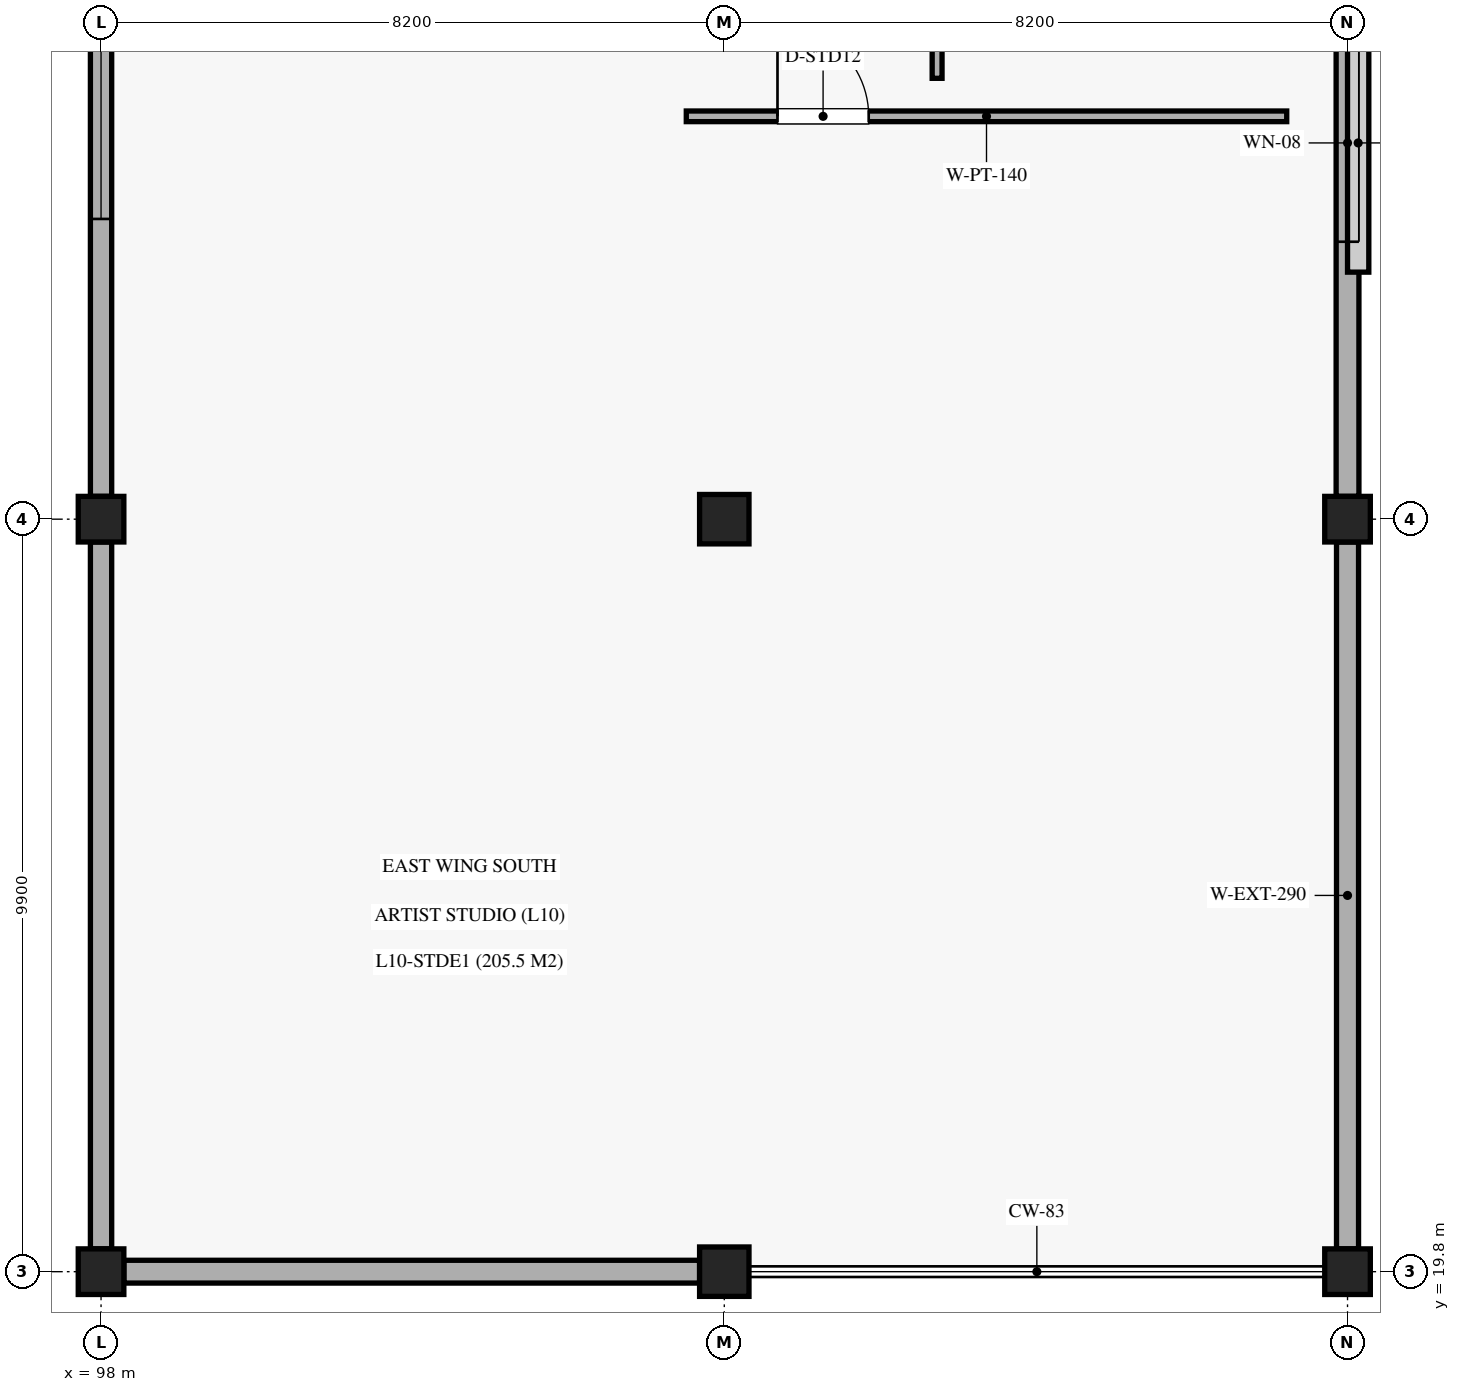
"""IFC4 building model, lengths in metres.
Left out: names, types, materials, properties, quantities, classifications, styles, units other than length and angle.
Written with IfcOpenShell. Run it as: python <this file> out.ifc"""

import sys

from ifc_helpers import new_model, si_unit, direction, frame, frame_2d, origin, origin_2d, place, context, subcontext, project, spatial, rectangle, extrude, element, fill, save


model = new_model("IFC4")
c1 = context("Model", 3, precision=1e-05, world=origin(), true_north=direction((0.0, 1.0)))
c2 = subcontext(c1, "Body", "Model", "MODEL_VIEW")
j1 = project(units=[si_unit("LENGTHUNIT", "METRE"), si_unit("PLANEANGLEUNIT", "RADIAN")], contexts=[c1])
p1 = place(None, origin())
s1 = spatial("IfcSite", under=j1, at=p1, CompositionType="ELEMENT")
p2 = place(p1, origin())
s2 = spatial("IfcBuilding", under=s1, at=p2, CompositionType="ELEMENT")
p3 = place(p2, frame((0.0, 0.0, 52.02)))
s3 = spatial("IfcBuildingStorey", under=s2, at=p3, CompositionType="ELEMENT", Elevation=52.02)
for number, where, z_axis, x_axis in (
    (1, (98.0, 19.8, 0.0), (0.0, 0.0, 1.0), (1.0, 0.0, 0.0)),
    (2, (98.0, 29.7, 0.0), (0.0, 0.0, 1.0), (1.0, 0.0, 0.0)),
):
    element("IfcColumn", number, at=place(p3, frame(where, z_axis=z_axis, x_axis=x_axis)), inside=s3, PredefinedType="COLUMN", context=c2, shape_type="SweptSolid", body=[
        extrude(rectangle(XDim=0.6, YDim=0.6, at=origin_2d()), origin(), (0.0, 0.0, 1.0), 5.1),
    ])
for number, where, z_axis, x_axis in (
    (3, (106.2, 19.8, 0.0), (0.0, 0.0, 1.0), (1.0, 0.0, 0.0)),
    (4, (106.2, 29.7, 0.0), (0.0, 0.0, 1.0), (1.0, 0.0, 0.0)),
):
    element("IfcColumn", number, at=place(p3, frame(where, z_axis=z_axis, x_axis=x_axis)), inside=s3, PredefinedType="COLUMN", context=c2, shape_type="SweptSolid", body=[
        extrude(rectangle(XDim=0.65, YDim=0.65, at=origin_2d()), origin(), (0.0, 0.0, 1.0), 5.1),
    ])
for number, where, z_axis, x_axis in (
    (5, (114.4, 19.8, 0.0), (0.0, 0.0, 1.0), (1.0, 0.0, 0.0)),
    (6, (114.4, 29.7, 0.0), (0.0, 0.0, 1.0), (1.0, 0.0, 0.0)),
):
    element("IfcColumn", number, at=place(p3, frame(where, z_axis=z_axis, x_axis=x_axis)), inside=s3, PredefinedType="COLUMN", context=c2, shape_type="SweptSolid", body=[
        extrude(rectangle(XDim=0.6, YDim=0.6, at=origin_2d()), origin(), (0.0, 0.0, 1.0), 5.1),
    ])
p4 = place(p3, frame((98.0, 20.1, 0.0), z_axis=(0.0, 0.0, 1.0), x_axis=(0.0, 1.0, 0.0)))
e7 = element("IfcWall", 7, at=p4, inside=s3, PredefinedType="SOLIDWALL", context=c2, shape_type="SweptSolid", body=[
    extrude(rectangle(XDim=9.3, YDim=0.28, at=frame_2d((4.65, 0.0))), origin(), (0.0, 0.0, 1.0), 4.1),
])
p5 = place(p3, frame((114.4, 20.1, 0.0), z_axis=(0.0, 0.0, 1.0), x_axis=(0.0, 1.0, 0.0)))
e8 = element("IfcWall", 8, at=p5, inside=s3, PredefinedType="SOLIDWALL", context=c2, shape_type="SweptSolid", body=[
    extrude(rectangle(XDim=9.3, YDim=0.29, at=frame_2d((4.65, 0.0))), origin(), (0.0, 0.0, 1.0), 4.1),
])
p6 = place(p3, frame((98.0, 30.0, 0.0), z_axis=(0.0, 0.0, 1.0), x_axis=(0.0, 1.0, 0.0)))
e9 = element("IfcWall", 9, at=p6, inside=s3, PredefinedType="SOLIDWALL", context=c2, shape_type="SweptSolid", body=[
    extrude(rectangle(XDim=9.3, YDim=0.28, at=frame_2d((4.65, 0.0))), origin(), (0.0, 0.0, 1.0), 4.1),
])
p7 = place(p6, frame((3.65, 0.0, 1.45)))
e10 = element("IfcOpeningElement", 10, at=p7, cuts=e9, PredefinedType="OPENING", context=c2, shape_type="SweptSolid", body=[
    extrude(rectangle(XDim=2.5, YDim=1.6, at=frame_2d((1.25, 0.8))), frame((0.0, 0.15, 0.0), z_axis=(0.0, -1.0, 0.0), x_axis=(1.0, 0.0, 0.0)), (0.0, 0.0, 1.0), 0.3),
])
p8 = place(p3, frame((114.4, 30.0, 0.0), z_axis=(0.0, 0.0, 1.0), x_axis=(0.0, 1.0, 0.0)))
e11 = element("IfcWall", 11, at=p8, inside=s3, PredefinedType="SOLIDWALL", context=c2, shape_type="SweptSolid", body=[
    extrude(rectangle(XDim=9.3, YDim=0.3, at=frame_2d((4.65, 0.0))), origin(), (0.0, 0.0, 1.0), 4.1),
])
p9 = place(p8, frame((3.35, 0.0, 1.65)))
e12 = element("IfcOpeningElement", 12, at=p9, cuts=e11, PredefinedType="OPENING", context=c2, shape_type="SweptSolid", body=[
    extrude(rectangle(XDim=2.6, YDim=1.85, at=frame_2d((1.3, 0.925))), frame((0.0, 0.16, 0.0), z_axis=(0.0, -1.0, 0.0), x_axis=(1.0, 0.0, 0.0)), (0.0, 0.0, 1.0), 0.32),
])
p10 = place(p3, frame((98.3, 19.8, 0.0), z_axis=(0.0, 0.0, 1.0), x_axis=(1.0, 0.0, 0.0)))
e13 = element("IfcWall", 13, at=p10, inside=s3, PredefinedType="SOLIDWALL", context=c2, shape_type="SweptSolid", body=[
    extrude(rectangle(XDim=7.575, YDim=0.3, at=frame_2d((3.788, 0.0))), origin(), (0.0, 0.0, 1.0), 4.1),
])
p11 = place(p3, frame((105.7, 35.0, 0.0), z_axis=(0.0, 0.0, 1.0), x_axis=(1.0, 0.0, 0.0)))
e14 = element("IfcWall", 14, at=p11, inside=s3, PredefinedType="PARTITIONING", context=c2, shape_type="SweptSolid", body=[
    extrude(rectangle(XDim=7.9, YDim=0.14, at=frame_2d((3.95, 0.0))), origin(), (0.0, 0.0, 1.0), 3.97),
])
p12 = place(p11, frame((1.2, 0.0, 0.0)))
e15 = element("IfcOpeningElement", 15, at=p12, cuts=e14, PredefinedType="OPENING", context=c2, shape_type="SweptSolid", body=[
    extrude(rectangle(XDim=1.2, YDim=2.25, at=frame_2d((0.6, 1.125))), frame((0.0, 0.08, 0.0), z_axis=(0.0, -1.0, 0.0), x_axis=(1.0, 0.0, 0.0)), (0.0, 0.0, 1.0), 0.16),
])
p13 = place(p3, frame((109.0, 35.5, 0.0), z_axis=(0.0, 0.0, 1.0), x_axis=(0.0, 1.0, 0.0)))
e16 = element("IfcWall", 16, at=p13, inside=s3, PredefinedType="PARTITIONING", context=c2, shape_type="SweptSolid", body=[
    extrude(rectangle(XDim=27.0, YDim=0.13, at=frame_2d((13.5, 0.0))), origin(), (0.0, 0.0, 1.0), 3.97),
])
p14 = place(p13, frame((8.0, 0.0, 0.0)))
e17 = element("IfcOpeningElement", 17, at=p14, cuts=e16, PredefinedType="OPENING", context=c2, shape_type="SweptSolid", body=[
    extrude(rectangle(XDim=1.2, YDim=2.25, at=frame_2d((0.6, 1.125))), frame((0.0, 0.075, 0.0), z_axis=(0.0, -1.0, 0.0), x_axis=(1.0, 0.0, 0.0)), (0.0, 0.0, 1.0), 0.15),
])
p15 = place(p7, origin())
e18 = element("IfcWindow", 18, at=p15, inside=s3, PartitioningType="SINGLE_PANEL", PredefinedType="WINDOW", context=c2, shape_type="SweptSolid", body=[
    extrude(rectangle(XDim=2.5, YDim=1.6, at=frame_2d((1.25, 0.8))), frame((0.0, 0.03, 0.0), z_axis=(0.0, -1.0, 0.0), x_axis=(1.0, 0.0, 0.0)), (0.0, 0.0, 1.0), 0.06),
])
fill(e10, e18)
p16 = place(p9, origin())
e19 = element("IfcWindow", 19, at=p16, inside=s3, PartitioningType="SINGLE_PANEL", PredefinedType="WINDOW", context=c2, shape_type="SweptSolid", body=[
    extrude(rectangle(XDim=2.6, YDim=1.85, at=frame_2d((1.3, 0.925))), frame((0.0, 0.03, 0.0), z_axis=(0.0, -1.0, 0.0), x_axis=(1.0, 0.0, 0.0)), (0.0, 0.0, 1.0), 0.06),
])
fill(e12, e19)
p17 = place(p12, origin())
e20 = element("IfcDoor", 20, at=p17, inside=s3, OperationType="SINGLE_SWING_LEFT", PredefinedType="DOOR", context=c2, shape_type="SweptSolid", body=[
    extrude(rectangle(XDim=1.2, YDim=2.25, at=frame_2d((0.6, 1.125))), frame((0.0, 0.025, 0.0), z_axis=(0.0, -1.0, 0.0), x_axis=(1.0, 0.0, 0.0)), (0.0, 0.0, 1.0), 0.05),
])
fill(e15, e20)
save(model, sys.argv[1])
